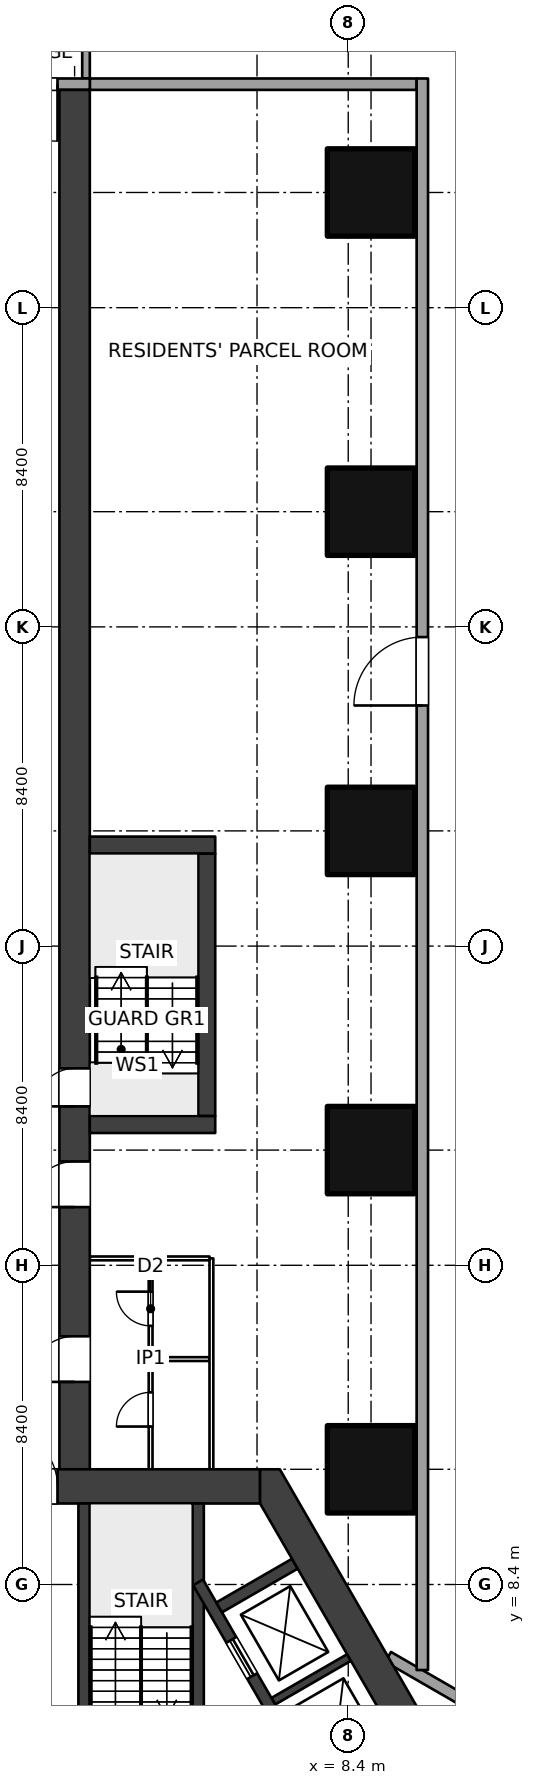
"""IFC4 building model, lengths in metres.
Left out: names, types, materials, properties, quantities, classifications, styles, units other than length and angle.
Written with IfcOpenShell. Run it as: python <this file> out.ifc"""

import sys

from ifc_helpers import new_model, si_unit, direction, frame, frame_2d, origin, origin_2d, place, context, subcontext, project, spatial, polyline, rectangle, outline, extrude, element, fill, save


model = new_model("IFC4")
c1 = context("Model", 3, precision=1e-05, world=origin(), true_north=direction((0.0, 1.0)))
c2 = subcontext(c1, "Body", "Model", "MODEL_VIEW")
j1 = project(units=[si_unit("LENGTHUNIT", "METRE"), si_unit("PLANEANGLEUNIT", "RADIAN")], contexts=[c1])
p1 = place(None, origin())
s1 = spatial("IfcSite", under=j1, at=p1, CompositionType="ELEMENT")
p2 = place(p1, origin())
s2 = spatial("IfcBuilding", under=s1, at=p2, CompositionType="ELEMENT")
p3 = place(p2, origin())
s3 = spatial("IfcBuildingStorey", under=s2, at=p3, CompositionType="ELEMENT", Elevation=0.0)
for number, where, z_axis, x_axis in (
    (1, (9.0, 11.432, 0.0), (0.0, 0.0, 1.0), (1.0, 0.0, 0.0)),
    (2, (9.0, 19.832, 0.0), (0.0, 0.0, 1.0), (1.0, 0.0, 0.0)),
    (3, (9.0, 28.231, 0.0), (0.0, 0.0, 1.0), (1.0, 0.0, 0.0)),
    (4, (9.0, 36.632, 0.0), (0.0, 0.0, 1.0), (1.0, 0.0, 0.0)),
    (5, (9.0, 45.031, 0.0), (0.0, 0.0, 1.0), (1.0, 0.0, 0.0)),
):
    element("IfcColumn", number, at=place(p3, frame(where, z_axis=z_axis, x_axis=x_axis)), inside=s3, PredefinedType="COLUMN", context=c2, shape_type="SweptSolid", body=[
        extrude(rectangle(XDim=2.3, YDim=2.3, at=origin_2d()), origin(), (0.0, 0.0, 1.0), 6.0),
    ])
p4 = place(p3, frame((-6.08, 10.981, 0.0), z_axis=(0.0, 0.0, 1.0), x_axis=(1.0, 0.0, 0.0)))
e6 = element("IfcWall", 6, at=p4, inside=s3, PredefinedType="SHEAR", context=c2, shape_type="SweptSolid", body=[
    extrude(rectangle(XDim=12.161, YDim=0.9, at=frame_2d((6.08, 0.0))), origin(), (0.0, 0.0, 1.0), 6.0),
])
p5 = place(p4, frame((5.33, 0.0, 0.0)))
e7 = element("IfcOpeningElement", 7, at=p5, cuts=e6, PredefinedType="OPENING", context=c2, shape_type="SweptSolid", body=[
    extrude(rectangle(XDim=1.5, YDim=2.1, at=frame_2d((0.75, 1.05))), frame((0.0, 0.46, 0.0), z_axis=(0.0, -1.0, 0.0), x_axis=(1.0, 0.0, 0.0)), (0.0, 0.0, 1.0), 0.92),
])
p6 = place(p3, origin())
e8 = element("IfcWall", 8, at=p6, inside=s3, PredefinedType="SHEAR", context=c2, shape_type="SweptSolid", body=[
    extrude(outline(polyline([(13.2, 0.0), (6.6, 11.432), (6.08, 11.432), (6.08, 10.531), (12.161, 0.0), (12.94, -0.45), (13.2, 0.0)])), origin(), (0.0, 0.0, 1.0), 6.0),
])
p7 = place(p3, frame((1.45, 3.63, 0.0), z_axis=(0.0, 0.0, 1.0), x_axis=(0.0, 1.0, 0.0)))
e9 = element("IfcWall", 9, at=p7, inside=s3, PredefinedType="SHEAR", context=c2, shape_type="SweptSolid", body=[
    extrude(rectangle(XDim=6.902, YDim=0.3, at=frame_2d((3.451, 0.0))), origin(), (0.0, 0.0, 1.0), 6.0),
])
p8 = place(p7, frame((0.25, 0.0, 0.0)))
e10 = element("IfcOpeningElement", 10, at=p8, cuts=e9, PredefinedType="OPENING", context=c2, shape_type="SweptSolid", body=[
    extrude(rectangle(XDim=1.0, YDim=2.1, at=frame_2d((0.5, 1.05))), frame((0.0, 0.16, 0.0), z_axis=(0.0, -1.0, 0.0), x_axis=(1.0, 0.0, 0.0)), (0.0, 0.0, 1.0), 0.32),
])
p9 = place(p3, frame((4.45, 3.63, 0.0), z_axis=(0.0, 0.0, 1.0), x_axis=(0.0, 1.0, 0.0)))
e11 = element("IfcWall", 11, at=p9, inside=s3, PredefinedType="SHEAR", context=c2, shape_type="SweptSolid", body=[
    extrude(rectangle(XDim=6.902, YDim=0.3, at=frame_2d((3.451, 0.0))), origin(), (0.0, 0.0, 1.0), 6.0),
])
p10 = place(p3, frame((4.45, 8.455, 0.0), z_axis=(0.0, 0.0, 1.0), x_axis=(0.500002290144, -0.866024081565, 0.0)))
e12 = element("IfcWall", 12, at=p10, inside=s3, PredefinedType="SHEAR", context=c2, shape_type="SweptSolid", body=[
    extrude(rectangle(XDim=10.195, YDim=0.3, at=frame_2d((5.098, 0.0))), origin(), (0.0, 0.0, 1.0), 6.0),
])
p11 = place(p10, frame((1.748, 0.0, 0.0)))
e13 = element("IfcOpeningElement", 13, at=p11, cuts=e12, PredefinedType="OPENING", context=c2, shape_type="SweptSolid", body=[
    extrude(rectangle(XDim=1.1, YDim=2.1, at=frame_2d((0.55, 1.05))), frame((0.0, 0.16, 0.0), z_axis=(0.0, -1.0, 0.0), x_axis=(1.0, 0.0, 0.0)), (0.0, 0.0, 1.0), 0.32),
])
p12 = place(p10, frame((4.548, 0.0, 0.0)))
e14 = element("IfcOpeningElement", 14, at=p12, cuts=e12, PredefinedType="OPENING", context=c2, shape_type="SweptSolid", body=[
    extrude(rectangle(XDim=1.1, YDim=2.1, at=frame_2d((0.55, 1.05))), frame((0.0, 0.16, 0.0), z_axis=(0.0, -1.0, 0.0), x_axis=(1.0, 0.0, 0.0)), (0.0, 0.0, 1.0), 0.32),
])
p13 = place(p10, frame((7.348, 0.0, 0.0)))
e15 = element("IfcOpeningElement", 15, at=p13, cuts=e12, PredefinedType="OPENING", context=c2, shape_type="SweptSolid", body=[
    extrude(rectangle(XDim=1.1, YDim=2.1, at=frame_2d((0.55, 1.05))), frame((0.0, 0.16, 0.0), z_axis=(0.0, -1.0, 0.0), x_axis=(1.0, 0.0, 0.0)), (0.0, 0.0, 1.0), 0.32),
])
p14 = place(p3, frame((5.004, 7.796, 0.0), z_axis=(0.0, 0.0, 1.0), x_axis=(0.866053019151, 0.499952165731, 0.0)))
e16 = element("IfcWall", 16, at=p14, inside=s3, PredefinedType="SHEAR", context=c2, shape_type="SweptSolid", body=[
    extrude(rectangle(XDim=2.3, YDim=0.3, at=frame_2d((1.15, 0.0))), origin(), (0.0, 0.0, 1.0), 6.0),
])
p15 = place(p3, frame((6.429, 5.328, 0.0), z_axis=(0.0, 0.0, 1.0), x_axis=(0.866007057882, 0.500031774688, 0.0)))
e17 = element("IfcWall", 17, at=p15, inside=s3, PredefinedType="SHEAR", context=c2, shape_type="SweptSolid", body=[
    extrude(rectangle(XDim=2.3, YDim=0.2, at=frame_2d((1.15, 0.0))), origin(), (0.0, 0.0, 1.0), 6.0),
])
p16 = place(p3, frame((1.2, 10.981, 0.0), z_axis=(0.0, 0.0, 1.0), x_axis=(0.0, 1.0, 0.0)))
e18 = element("IfcWall", 18, at=p16, inside=s3, PredefinedType="SHEAR", context=c2, shape_type="SweptSolid", body=[
    extrude(rectangle(XDim=36.75, YDim=0.8, at=frame_2d((18.375, 0.0))), origin(), (0.0, 0.0, 1.0), 6.0),
])
p17 = place(p16, frame((10.0, 0.0, 0.0)))
e19 = element("IfcOpeningElement", 19, at=p17, cuts=e18, PredefinedType="OPENING", context=c2, shape_type="SweptSolid", body=[
    extrude(rectangle(XDim=1.0, YDim=2.1, at=frame_2d((0.5, 1.05))), frame((0.0, 0.41, 0.0), z_axis=(0.0, -1.0, 0.0), x_axis=(1.0, 0.0, 0.0)), (0.0, 0.0, 1.0), 0.82),
])
p18 = place(p16, frame((2.75, 0.0, 0.0)))
e20 = element("IfcOpeningElement", 20, at=p18, cuts=e18, PredefinedType="OPENING", context=c2, shape_type="SweptSolid", body=[
    extrude(rectangle(XDim=1.2, YDim=2.1, at=frame_2d((0.6, 1.05))), frame((0.0, 0.41, 0.0), z_axis=(0.0, -1.0, 0.0), x_axis=(1.0, 0.0, 0.0)), (0.0, 0.0, 1.0), 0.82),
])
p19 = place(p16, frame((7.35, 0.0, 0.0)))
e21 = element("IfcOpeningElement", 21, at=p19, cuts=e18, PredefinedType="OPENING", context=c2, shape_type="SweptSolid", body=[
    extrude(rectangle(XDim=1.2, YDim=2.1, at=frame_2d((0.6, 1.05))), frame((0.0, 0.41, 0.0), z_axis=(0.0, -1.0, 0.0), x_axis=(1.0, 0.0, 0.0)), (0.0, 0.0, 1.0), 0.82),
])
p20 = place(p3, frame((3.2, 11.432, 0.0), z_axis=(0.0, 0.0, 1.0), x_axis=(0.0, 1.0, 0.0)))
e22 = element("IfcWall", 22, at=p20, inside=s3, PredefinedType="PARTITIONING", context=c2, shape_type="SweptSolid", body=[
    extrude(rectangle(XDim=5.6, YDim=0.1, at=frame_2d((2.8, 0.0))), origin(), (0.0, 0.0, 1.0), 5.7),
])
p21 = place(p20, frame((1.125, 0.0, 0.0)))
e23 = element("IfcOpeningElement", 23, at=p21, cuts=e22, PredefinedType="OPENING", context=c2, shape_type="SweptSolid", body=[
    extrude(rectangle(XDim=0.9, YDim=2.1, at=frame_2d((0.45, 1.05))), frame((0.0, 0.06, 0.0), z_axis=(0.0, -1.0, 0.0), x_axis=(1.0, 0.0, 0.0)), (0.0, 0.0, 1.0), 0.12),
])
p22 = place(p20, frame((3.775, 0.0, 0.0)))
e24 = element("IfcOpeningElement", 24, at=p22, cuts=e22, PredefinedType="OPENING", context=c2, shape_type="SweptSolid", body=[
    extrude(rectangle(XDim=0.9, YDim=2.1, at=frame_2d((0.45, 1.05))), frame((0.0, 0.06, 0.0), z_axis=(0.0, -1.0, 0.0), x_axis=(1.0, 0.0, 0.0)), (0.0, 0.0, 1.0), 0.12),
])
p23 = place(p3, frame((3.25, 14.332, 0.0), z_axis=(0.0, 0.0, 1.0), x_axis=(1.0, 0.0, 0.0)))
e25 = element("IfcWall", 25, at=p23, inside=s3, PredefinedType="PARTITIONING", context=c2, shape_type="SweptSolid", body=[
    extrude(rectangle(XDim=1.5, YDim=0.1, at=frame_2d((0.75, 0.0))), origin(), (0.0, 0.0, 1.0), 5.7),
])
p24 = place(p3, frame((4.8, 11.432, 0.0), z_axis=(0.0, 0.0, 1.0), x_axis=(0.0, 1.0, 0.0)))
e26 = element("IfcWall", 26, at=p24, inside=s3, PredefinedType="PARTITIONING", context=c2, shape_type="SweptSolid", body=[
    extrude(rectangle(XDim=5.55, YDim=0.1, at=frame_2d((2.775, 0.0))), origin(), (0.0, 0.0, 1.0), 5.7),
])
p25 = place(p3, frame((1.6, 16.981, 0.0), z_axis=(0.0, 0.0, 1.0), x_axis=(1.0, 0.0, 0.0)))
e27 = element("IfcWall", 27, at=p25, inside=s3, PredefinedType="PARTITIONING", context=c2, shape_type="SweptSolid", body=[
    extrude(rectangle(XDim=3.15, YDim=0.1, at=frame_2d((1.575, 0.0))), origin(), (0.0, 0.0, 1.0), 5.7),
])
p26 = place(p3, frame((1.6, 47.882, 0.0), z_axis=(0.0, 0.0, 1.0), x_axis=(-1.0, 0.0, 0.0)))
e28 = element("IfcWall", 28, at=p26, inside=s3, PredefinedType="SOLIDWALL", context=c2, shape_type="SweptSolid", body=[
    extrude(rectangle(XDim=3.2, YDim=0.3, at=frame_2d((1.6, 0.0))), origin(), (0.0, 0.0, 1.0), 5.7),
])
p27 = place(p26, frame((0.85, 0.0, 0.0)))
e29 = element("IfcOpeningElement", 29, at=p27, cuts=e28, PredefinedType="OPENING", context=c2, shape_type="SweptSolid", body=[
    extrude(rectangle(XDim=1.5, YDim=2.1, at=frame_2d((0.75, 1.05))), frame((0.0, 0.16, 0.0), z_axis=(0.0, -1.0, 0.0), x_axis=(1.0, 0.0, 0.0)), (0.0, 0.0, 1.0), 0.32),
])
p28 = place(p3, frame((1.5, 48.031, 0.0), z_axis=(0.0, 0.0, 1.0), x_axis=(0.0, 1.0, 0.0)))
e30 = element("IfcWall", 30, at=p28, inside=s3, PredefinedType="SOLIDWALL", context=c2, shape_type="SweptSolid", body=[
    extrude(rectangle(XDim=2.069, YDim=0.2, at=frame_2d((1.034, 0.0))), origin(), (0.0, 0.0, 1.0), 5.7),
])
p29 = place(p3, frame((1.6, 47.882, 0.0), z_axis=(0.0, 0.0, 1.0), x_axis=(1.0, 0.0, 0.0)))
e31 = element("IfcWall", 31, at=p29, inside=s3, PredefinedType="SOLIDWALL", context=c2, shape_type="SweptSolid", body=[
    extrude(rectangle(XDim=8.6, YDim=0.3, at=frame_2d((4.3, 0.0))), origin(), (0.0, 0.0, 1.0), 4.1),
])
p30 = place(p3, frame((10.35, 6.149, 0.0), z_axis=(0.0, 0.0, 1.0), x_axis=(0.0, 1.0, 0.0)))
e32 = element("IfcWall", 32, at=p30, inside=s3, PredefinedType="SOLIDWALL", context=c2, shape_type="SweptSolid", body=[
    extrude(rectangle(XDim=41.883, YDim=0.3, at=frame_2d((20.941, 0.0))), origin(), (0.0, 0.0, 1.0), 5.7),
])
p31 = place(p30, frame((25.383, 0.0, 0.0)))
e33 = element("IfcOpeningElement", 33, at=p31, cuts=e32, PredefinedType="OPENING", context=c2, shape_type="SweptSolid", body=[
    extrude(rectangle(XDim=1.8, YDim=2.4, at=frame_2d((0.9, 1.2))), frame((0.0, 0.16, 0.0), z_axis=(0.0, -1.0, 0.0), x_axis=(1.0, 0.0, 0.0)), (0.0, 0.0, 1.0), 0.32),
])
p32 = place(p3, frame((9.45, 6.495, 0.0), z_axis=(0.0, 0.0, 1.0), x_axis=(0.866025301493, -0.500000177174, 0.0)))
e34 = element("IfcWall", 34, at=p32, inside=s3, PredefinedType="SOLIDWALL", context=c2, shape_type="SweptSolid", body=[
    extrude(rectangle(XDim=43.095, YDim=0.3, at=frame_2d((21.548, 0.0))), origin(), (0.0, 0.0, 1.0), 5.7),
])
p33 = place(p32, frame((26.595, 0.0, 0.0)))
e35 = element("IfcOpeningElement", 35, at=p33, cuts=e34, PredefinedType="OPENING", context=c2, shape_type="SweptSolid", body=[
    extrude(rectangle(XDim=1.8, YDim=2.4, at=frame_2d((0.9, 1.2))), frame((0.0, 0.16, 0.0), z_axis=(0.0, -1.0, 0.0), x_axis=(1.0, 0.0, 0.0)), (0.0, 0.0, 1.0), 0.32),
])
for number, where, z_axis, x_axis in (
    (36, (1.6, 20.507, 0.0), (0.0, 0.0, 1.0), (1.0, 0.0, 0.0)),
    (37, (1.6, 27.856, 0.0), (0.0, 0.0, 1.0), (1.0, 0.0, 0.0)),
):
    element("IfcWall", number, at=place(p3, frame(where, z_axis=z_axis, x_axis=x_axis)), inside=s3, PredefinedType="SOLIDWALL", context=c2, shape_type="SweptSolid", body=[
        extrude(rectangle(XDim=3.3, YDim=0.45, at=frame_2d((1.65, 0.0))), origin(), (0.0, 0.0, 1.0), 6.0),
    ])
p34 = place(p3, frame((4.675, 20.731, 0.0), z_axis=(0.0, 0.0, 1.0), x_axis=(0.0, 1.0, 0.0)))
e38 = element("IfcWall", 38, at=p34, inside=s3, PredefinedType="SOLIDWALL", context=c2, shape_type="SweptSolid", body=[
    extrude(rectangle(XDim=6.9, YDim=0.45, at=frame_2d((3.45, 0.0))), origin(), (0.0, 0.0, 1.0), 6.0),
])
p35 = place(p11, origin())
e39 = element("IfcDoor", 39, at=p35, inside=s3, OperationType="DOUBLE_DOOR_SLIDING", PredefinedType="DOOR", context=c2, shape_type="SweptSolid", body=[
    extrude(rectangle(XDim=1.1, YDim=2.1, at=frame_2d((0.55, 1.05))), frame((0.0, 0.025, 0.0), z_axis=(0.0, -1.0, 0.0), x_axis=(1.0, 0.0, 0.0)), (0.0, 0.0, 1.0), 0.05),
])
fill(e13, e39)
p36 = place(p5, origin())
e40 = element("IfcDoor", 40, at=p36, inside=s3, OperationType="DOUBLE_DOOR_DOUBLE_SWING", PredefinedType="DOOR", context=c2, shape_type="SweptSolid", body=[
    extrude(rectangle(XDim=1.5, YDim=2.1, at=frame_2d((0.75, 1.05))), frame((0.0, 0.025, 0.0), z_axis=(0.0, -1.0, 0.0), x_axis=(1.0, 0.0, 0.0)), (0.0, 0.0, 1.0), 0.05),
])
fill(e7, e40)
p37 = place(p17, origin())
e41 = element("IfcDoor", 41, at=p37, inside=s3, OperationType="SINGLE_SWING_LEFT", PredefinedType="DOOR", context=c2, shape_type="SweptSolid", body=[
    extrude(rectangle(XDim=1.0, YDim=2.1, at=frame_2d((0.5, 1.05))), frame((0.0, 0.025, 0.0), z_axis=(0.0, -1.0, 0.0), x_axis=(1.0, 0.0, 0.0)), (0.0, 0.0, 1.0), 0.05),
])
fill(e19, e41)
p38 = place(p21, origin())
e42 = element("IfcDoor", 42, at=p38, inside=s3, OperationType="SINGLE_SWING_LEFT", PredefinedType="DOOR", context=c2, shape_type="SweptSolid", body=[
    extrude(rectangle(XDim=0.9, YDim=2.1, at=frame_2d((0.45, 1.05))), frame((0.0, 0.025, 0.0), z_axis=(0.0, -1.0, 0.0), x_axis=(1.0, 0.0, 0.0)), (0.0, 0.0, 1.0), 0.05),
])
fill(e23, e42)
p39 = place(p22, origin())
e43 = element("IfcDoor", 43, at=p39, inside=s3, OperationType="SINGLE_SWING_RIGHT", PredefinedType="DOOR", context=c2, shape_type="SweptSolid", body=[
    extrude(rectangle(XDim=0.9, YDim=2.1, at=frame_2d((0.45, 1.05))), frame((0.0, 0.025, 0.0), z_axis=(0.0, -1.0, 0.0), x_axis=(1.0, 0.0, 0.0)), (0.0, 0.0, 1.0), 0.05),
])
fill(e24, e43)
p40 = place(p18, origin())
e44 = element("IfcDoor", 44, at=p40, inside=s3, OperationType="DOUBLE_SWING_LEFT", PredefinedType="DOOR", context=c2, shape_type="SweptSolid", body=[
    extrude(rectangle(XDim=1.2, YDim=2.1, at=frame_2d((0.6, 1.05))), frame((0.0, 0.025, 0.0), z_axis=(0.0, -1.0, 0.0), x_axis=(1.0, 0.0, 0.0)), (0.0, 0.0, 1.0), 0.05),
])
fill(e20, e44)
p41 = place(p19, origin())
e45 = element("IfcDoor", 45, at=p41, inside=s3, OperationType="DOUBLE_SWING_LEFT", PredefinedType="DOOR", context=c2, shape_type="SweptSolid", body=[
    extrude(rectangle(XDim=1.2, YDim=2.1, at=frame_2d((0.6, 1.05))), frame((0.0, 0.025, 0.0), z_axis=(0.0, -1.0, 0.0), x_axis=(1.0, 0.0, 0.0)), (0.0, 0.0, 1.0), 0.05),
])
fill(e21, e45)
p42 = place(p27, origin())
e46 = element("IfcDoor", 46, at=p42, inside=s3, OperationType="DOUBLE_DOOR_DOUBLE_SWING", PredefinedType="DOOR", context=c2, shape_type="SweptSolid", body=[
    extrude(rectangle(XDim=1.5, YDim=2.1, at=frame_2d((0.75, 1.05))), frame((0.0, 0.025, 0.0), z_axis=(0.0, -1.0, 0.0), x_axis=(1.0, 0.0, 0.0)), (0.0, 0.0, 1.0), 0.05),
])
fill(e29, e46)
p43 = place(p31, origin())
e47 = element("IfcDoor", 47, at=p43, inside=s3, OperationType="DOUBLE_DOOR_DOUBLE_SWING", PredefinedType="DOOR", context=c2, shape_type="SweptSolid", body=[
    extrude(rectangle(XDim=1.8, YDim=2.4, at=frame_2d((0.9, 1.2))), frame((0.0, 0.025, 0.0), z_axis=(0.0, -1.0, 0.0), x_axis=(1.0, 0.0, 0.0)), (0.0, 0.0, 1.0), 0.05),
])
fill(e33, e47)
save(model, sys.argv[1])
